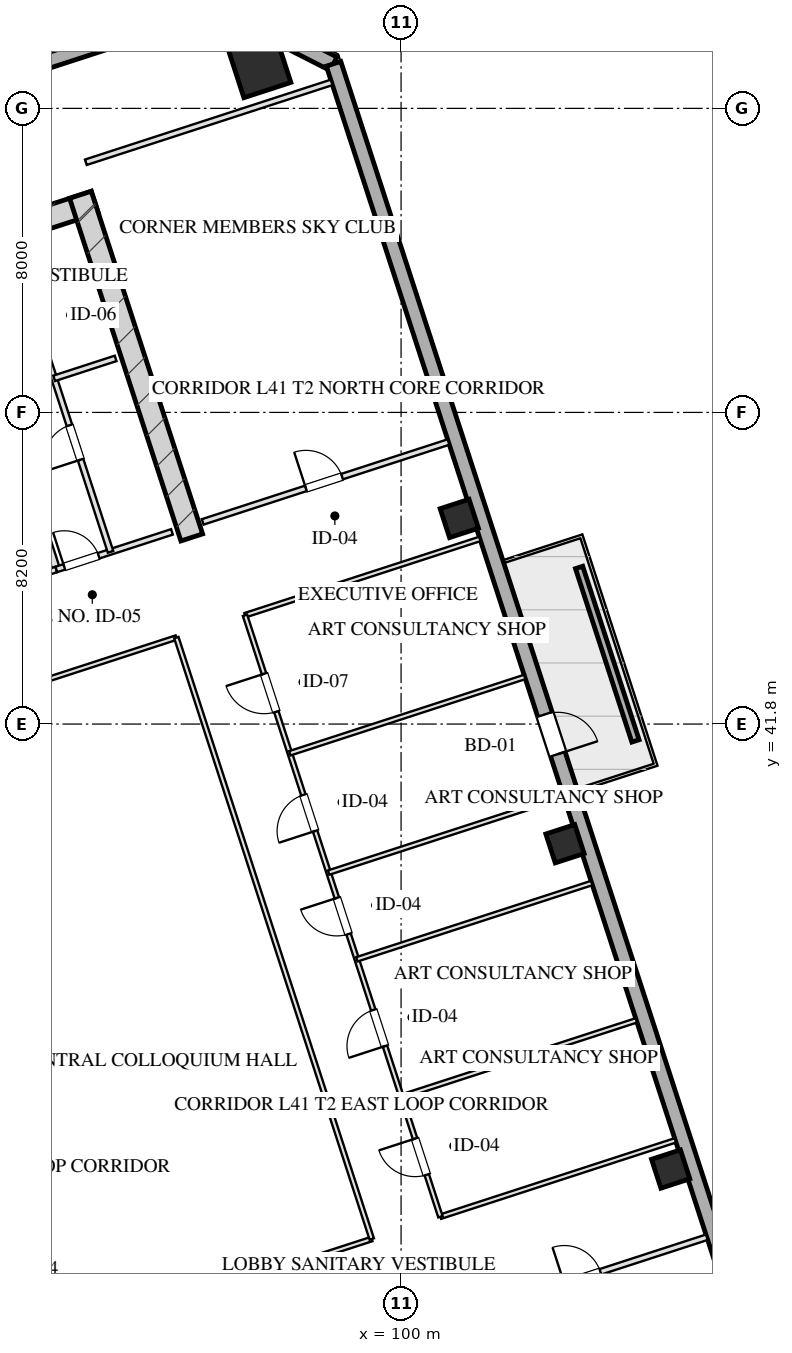
"""IFC4 building model, lengths in metres.
Left out: names, types, materials, properties, quantities, classifications, styles, units other than length and angle.
Written with IfcOpenShell. Run it as: python <this file> out.ifc"""

import sys

from ifc_helpers import new_model, si_unit, direction, frame, frame_2d, origin, origin_2d, place, context, subcontext, project, spatial, rectangle, hollow_rectangle, extrude, element, fill, save


model = new_model("IFC4")
c1 = context("Model", 3, precision=1e-05, world=origin(), true_north=direction((0.0, 1.0)))
c2 = subcontext(c1, "Body", "Model", "MODEL_VIEW")
j1 = project(units=[si_unit("LENGTHUNIT", "METRE"), si_unit("PLANEANGLEUNIT", "RADIAN")], contexts=[c1])
p1 = place(None, origin())
s1 = spatial("IfcSite", under=j1, at=p1, CompositionType="ELEMENT")
p2 = place(p1, origin())
s2 = spatial("IfcBuilding", under=s1, at=p2, CompositionType="ELEMENT")
p3 = place(p2, frame((0.0, 0.0, 156.4)))
s3 = spatial("IfcBuildingStorey", under=s2, at=p3, CompositionType="ELEMENT", Elevation=156.4)
p4 = place(p3, frame((76.344, 50.466, 0.0), z_axis=(0.0, 0.0, 1.0), x_axis=(0.951055727519, 0.309019421968, 0.0)))
e1 = element("IfcWall", 1, at=p4, inside=s3, PredefinedType="SHEAR", context=c2, shape_type="SweptSolid", body=[
    extrude(rectangle(XDim=16.4, YDim=0.6, at=frame_2d((8.2, 0.0))), origin(), (0.0, 0.0, 1.0), 3.45),
])
p5 = place(p3, frame((94.492, 46.71, 0.0), z_axis=(0.0, 0.0, 1.0), x_axis=(-0.309010370028, 0.95105866865, 0.0)))
e2 = element("IfcWall", 2, at=p5, inside=s3, PredefinedType="SHEAR", context=c2, shape_type="SweptSolid", body=[
    extrude(rectangle(XDim=9.48, YDim=0.6, at=frame_2d((4.74, 0.0))), origin(), (0.0, 0.0, 1.0), 3.45),
])
p6 = place(p3, frame((96.281, 59.099, 0.0), z_axis=(0.0, 0.0, 1.0), x_axis=(0.951056516295, 0.309016994375, 0.0)))
e3 = element("IfcColumn", 3, at=p6, inside=s3, PredefinedType="COLUMN", context=c2, shape_type="SweptSolid", body=[
    extrude(hollow_rectangle(XDim=1.3, YDim=1.3, WallThickness=0.045, at=origin_2d()), origin(), (0.0, 0.0, 1.0), 3.451),
])
for number, where, z_axis, x_axis in (
    (4, (107.094, 30.091, 0.0), (0.0, 0.0, 1.0), (0.951, 0.309, 0.0)),
    (5, (104.313, 38.651, 0.0), (0.0, 0.0, 1.0), (0.951, 0.309, 0.0)),
    (6, (101.532, 47.21, 0.0), (0.0, 0.0, 1.0), (0.951, 0.309, 0.0)),
):
    element("IfcColumn", number, at=place(p3, frame(where, z_axis=z_axis, x_axis=x_axis)), inside=s3, PredefinedType="COLUMN", context=c2, shape_type="SweptSolid", body=[
        extrude(hollow_rectangle(XDim=0.8, YDim=0.8, WallThickness=0.028, at=origin_2d()), origin(), (0.0, 0.0, 1.0), 3.451),
    ])
p7 = place(p3, frame((70.092, 52.556, 0.0), z_axis=(0.0, 0.0, 1.0), x_axis=(0.951057580055, 0.30901372044, 0.0)))
e7 = element("IfcWall", 7, at=p7, inside=s3, PredefinedType="SOLIDWALL", context=c2, shape_type="SweptSolid", body=[
    extrude(rectangle(XDim=26.4, YDim=0.4, at=frame_2d((13.2, 0.0))), origin(), (0.0, 0.0, 1.0), 2.61),
])
p8 = place(p3, frame((95.199, 60.714, 0.0), z_axis=(0.0, 0.0, 1.0), x_axis=(0.891020832027, -0.453962417932, 0.0)))
e8 = element("IfcWall", 8, at=p8, inside=s3, PredefinedType="SOLIDWALL", context=c2, shape_type="SweptSolid", body=[
    extrude(rectangle(XDim=3.394, YDim=0.4, at=frame_2d((1.697, 0.0))), origin(), (0.0, 0.0, 1.0), 2.61),
])
p9 = place(p3, frame((98.224, 59.173, 0.0), z_axis=(0.0, 0.0, 1.0), x_axis=(0.309014228706, -0.951057414911, 0.0)))
e9 = element("IfcWall", 9, at=p9, inside=s3, PredefinedType="SOLIDWALL", context=c2, shape_type="SweptSolid", body=[
    extrude(rectangle(XDim=42.8, YDim=0.4, at=frame_2d((21.4, 0.0))), origin(), (0.0, 0.0, 1.0), 2.61),
])
p10 = place(p9, frame((17.999, 0.0, 0.0)))
e10 = element("IfcOpeningElement", 10, at=p10, cuts=e9, PredefinedType="OPENING", context=c2, shape_type="SweptSolid", body=[
    extrude(rectangle(XDim=1.1, YDim=2.15, at=frame_2d((0.55, 1.075))), frame((0.0, 0.21, 0.0), z_axis=(0.0, -1.0, 0.0), x_axis=(1.0, 0.0, 0.0)), (0.0, 0.0, 1.0), 0.42),
])
p11 = place(p3, frame((106.168, 41.356, 0.0), z_axis=(0.0, 0.0, 1.0), x_axis=(-0.309032019345, 0.951051634255, 0.0)))
e11 = element("IfcWall", 11, at=p11, inside=s3, PredefinedType="PARAPET", context=c2, shape_type="SweptSolid", body=[
    extrude(rectangle(XDim=4.8, YDim=0.2, at=frame_2d((2.4, 0.0))), origin(), (0.0, 0.0, 1.0), 0.75),
])
p12 = place(p3, frame((90.928, 45.868, 0.0), z_axis=(0.0, 0.0, 1.0), x_axis=(-0.309042196757, 0.951048327176, 0.0)))
e12 = element("IfcWall", 12, at=p12, inside=s3, PredefinedType="PARTITIONING", context=c2, shape_type="SweptSolid", body=[
    extrude(rectangle(XDim=8.43, YDim=0.2, at=frame_2d((4.215, 0.0))), origin(), (0.0, 0.0, 1.0), 3.175),
])
p13 = place(p3, frame((86.743, 44.508, 0.0), z_axis=(0.0, 0.0, 1.0), x_axis=(0.951063829732, 0.308994485023, 0.0)))
e13 = element("IfcWall", 13, at=p13, inside=s3, PredefinedType="PARTITIONING", context=c2, shape_type="SweptSolid", body=[
    extrude(rectangle(XDim=4.4, YDim=0.15, at=frame_2d((2.2, 0.0))), origin(), (0.0, 0.0, 1.0), 3.175),
])
p14 = place(p13, frame((1.45, 0.0, 0.0)))
e14 = element("IfcOpeningElement", 14, at=p14, cuts=e13, PredefinedType="OPENING", context=c2, shape_type="SweptSolid", body=[
    extrude(rectangle(XDim=1.5, YDim=2.05, at=frame_2d((0.75, 1.025))), frame((0.0, 0.085, 0.0), z_axis=(0.0, -1.0, 0.0), x_axis=(1.0, 0.0, 0.0)), (0.0, 0.0, 1.0), 0.17),
])
p15 = place(p3, frame((90.928, 45.868, 0.0), z_axis=(0.0, 0.0, 1.0), x_axis=(0.951059297078, 0.309008435874, 0.0)))
e15 = element("IfcWall", 15, at=p15, inside=s3, PredefinedType="PARTITIONING", context=c2, shape_type="SweptSolid", body=[
    extrude(rectangle(XDim=3.2, YDim=0.15, at=frame_2d((1.6, 0.0))), origin(), (0.0, 0.0, 1.0), 3.175),
])
p16 = place(p15, frame((0.22, 0.0, 0.0)))
e16 = element("IfcOpeningElement", 16, at=p16, cuts=e15, PredefinedType="OPENING", context=c2, shape_type="SweptSolid", body=[
    extrude(rectangle(XDim=0.95, YDim=2.05, at=frame_2d((0.475, 1.025))), frame((0.0, 0.085, 0.0), z_axis=(0.0, -1.0, 0.0), x_axis=(1.0, 0.0, 0.0)), (0.0, 0.0, 1.0), 0.17),
])
p17 = place(p3, frame((92.355, 46.331, 0.0), z_axis=(0.0, 0.0, 1.0), x_axis=(-0.309007490203, 0.951059604335, 0.0)))
e17 = element("IfcWall", 17, at=p17, inside=s3, PredefinedType="PARTITIONING", context=c2, shape_type="SweptSolid", body=[
    extrude(rectangle(XDim=8.43, YDim=0.15, at=frame_2d((4.215, 0.0))), origin(), (0.0, 0.0, 1.0), 3.175),
])
p18 = place(p17, frame((2.55, 0.0, 0.0)))
e18 = element("IfcOpeningElement", 18, at=p18, cuts=e17, PredefinedType="OPENING", context=c2, shape_type="SweptSolid", body=[
    extrude(rectangle(XDim=0.95, YDim=2.05, at=frame_2d((0.475, 1.025))), frame((0.0, 0.085, 0.0), z_axis=(0.0, -1.0, 0.0), x_axis=(1.0, 0.0, 0.0)), (0.0, 0.0, 1.0), 0.17),
])
p19 = place(p17, frame((5.8, 0.0, 0.0)))
e19 = element("IfcOpeningElement", 19, at=p19, cuts=e17, PredefinedType="OPENING", context=c2, shape_type="SweptSolid", body=[
    extrude(rectangle(XDim=0.9, YDim=2.05, at=frame_2d((0.45, 1.025))), frame((0.0, 0.085, 0.0), z_axis=(0.0, -1.0, 0.0), x_axis=(1.0, 0.0, 0.0)), (0.0, 0.0, 1.0), 0.17),
])
p20 = place(p3, frame((90.871, 50.896, 0.0), z_axis=(0.0, 0.0, 1.0), x_axis=(0.951054116971, 0.309024378638, 0.0)))
e20 = element("IfcWall", 20, at=p20, inside=s3, PredefinedType="PARTITIONING", context=c2, shape_type="SweptSolid", body=[
    extrude(rectangle(XDim=1.7, YDim=0.15, at=frame_2d((0.85, 0.0))), origin(), (0.0, 0.0, 1.0), 3.175),
])
p21 = place(p3, frame((101.578, 26.196, 0.0), z_axis=(0.0, 0.0, 1.0), x_axis=(0.951064934653, 0.308991084134, 0.0)))
e21 = element("IfcWall", 21, at=p21, inside=s3, PredefinedType="PARTITIONING", context=c2, shape_type="SweptSolid", body=[
    extrude(rectangle(XDim=6.8, YDim=0.15, at=frame_2d((3.4, 0.0))), origin(), (0.0, 0.0, 1.0), 3.175),
])
p22 = place(p21, frame((2.856, 0.0, 0.0)))
e22 = element("IfcOpeningElement", 22, at=p22, cuts=e21, PredefinedType="OPENING", context=c2, shape_type="SweptSolid", body=[
    extrude(rectangle(XDim=1.0, YDim=2.05, at=frame_2d((0.5, 1.025))), frame((0.0, 0.085, 0.0), z_axis=(0.0, -1.0, 0.0), x_axis=(1.0, 0.0, 0.0)), (0.0, 0.0, 1.0), 0.17),
])
p23 = place(p3, frame((91.705, 56.582, 0.0), z_axis=(0.0, 0.0, 1.0), x_axis=(0.951057811516, 0.309013008068, 0.0)))
e23 = element("IfcWall", 23, at=p23, inside=s3, PredefinedType="PARTITIONING", context=c2, shape_type="SweptSolid", body=[
    extrude(rectangle(XDim=6.8, YDim=0.15, at=frame_2d((3.4, 0.0))), origin(), (0.0, 0.0, 1.0), 3.175),
])
p24 = place(p3, frame((94.78, 47.119, 0.0), z_axis=(0.0, 0.0, 1.0), x_axis=(0.951057811516, 0.309013008068, 0.0)))
e24 = element("IfcWall", 24, at=p24, inside=s3, PredefinedType="PARTITIONING", context=c2, shape_type="SweptSolid", body=[
    extrude(rectangle(XDim=6.8, YDim=0.15, at=frame_2d((3.4, 0.0))), origin(), (0.0, 0.0, 1.0), 3.175),
])
p25 = place(p24, frame((2.856, 0.0, 0.0)))
e25 = element("IfcOpeningElement", 25, at=p25, cuts=e24, PredefinedType="OPENING", context=c2, shape_type="SweptSolid", body=[
    extrude(rectangle(XDim=1.0, YDim=2.05, at=frame_2d((0.5, 1.025))), frame((0.0, 0.085, 0.0), z_axis=(0.0, -1.0, 0.0), x_axis=(1.0, 0.0, 0.0)), (0.0, 0.0, 1.0), 0.17),
])
p26 = place(p3, frame((91.382, 25.701, 0.0), z_axis=(0.0, 0.0, 1.0), x_axis=(0.951061683147, 0.309001091988, 0.0)))
e26 = element("IfcWall", 26, at=p26, inside=s3, PredefinedType="PARTITIONING", context=c2, shape_type="SweptSolid", body=[
    extrude(rectangle(XDim=8.25, YDim=0.12, at=frame_2d((4.125, 0.0))), origin(), (0.0, 0.0, 1.0), 3.175),
])
p27 = place(p3, frame((101.035, 28.837, 0.0), z_axis=(0.0, 0.0, 1.0), x_axis=(0.95104869662, 0.309041059824, 0.0)))
e27 = element("IfcWall", 27, at=p27, inside=s3, PredefinedType="PARTITIONING", context=c2, shape_type="SweptSolid", body=[
    extrude(rectangle(XDim=6.5, YDim=0.12, at=frame_2d((3.25, 0.0))), origin(), (0.0, 0.0, 1.0), 3.175),
])
p28 = place(p3, frame((86.24, 41.527, 0.0), z_axis=(0.0, 0.0, 1.0), x_axis=(0.951058857521, 0.309009788731, 0.0)))
e28 = element("IfcWall", 28, at=p28, inside=s3, PredefinedType="PARTITIONING", context=c2, shape_type="SweptSolid", body=[
    extrude(rectangle(XDim=8.25, YDim=0.12, at=frame_2d((4.125, 0.0))), origin(), (0.0, 0.0, 1.0), 3.175),
])
p29 = place(p3, frame((95.893, 44.663, 0.0), z_axis=(0.0, 0.0, 1.0), x_axis=(0.951059735424, 0.30900708674, 0.0)))
e29 = element("IfcWall", 29, at=p29, inside=s3, PredefinedType="PARTITIONING", context=c2, shape_type="SweptSolid", body=[
    extrude(rectangle(XDim=6.5, YDim=0.12, at=frame_2d((3.25, 0.0))), origin(), (0.0, 0.0, 1.0), 3.175),
])
p30 = place(p3, frame((91.382, 25.701, 0.0), z_axis=(0.0, 0.0, 1.0), x_axis=(-0.309004459387, 0.951060589068, 0.0)))
e30 = element("IfcWall", 30, at=p30, inside=s3, PredefinedType="PARTITIONING", context=c2, shape_type="SweptSolid", body=[
    extrude(rectangle(XDim=16.64, YDim=0.12, at=frame_2d((8.32, 0.0))), origin(), (0.0, 0.0, 1.0), 3.175),
])
p31 = place(p30, frame((7.987, 0.0, 0.0)))
e31 = element("IfcOpeningElement", 31, at=p31, cuts=e30, PredefinedType="OPENING", context=c2, shape_type="SweptSolid", body=[
    extrude(rectangle(XDim=1.1, YDim=2.05, at=frame_2d((0.55, 1.025))), frame((0.0, 0.07, 0.0), z_axis=(0.0, -1.0, 0.0), x_axis=(1.0, 0.0, 0.0)), (0.0, 0.0, 1.0), 0.14),
])
p32 = place(p3, frame((99.229, 28.25, 0.0), z_axis=(0.0, 0.0, 1.0), x_axis=(-0.30901773025, 0.951056277195, 0.0)))
e32 = element("IfcWall", 32, at=p32, inside=s3, PredefinedType="PARTITIONING", context=c2, shape_type="SweptSolid", body=[
    extrude(rectangle(XDim=16.64, YDim=0.12, at=frame_2d((8.32, 0.0))), origin(), (0.0, 0.0, 1.0), 3.175),
])
p33 = place(p3, frame((101.035, 28.837, 0.0), z_axis=(0.0, 0.0, 1.0), x_axis=(-0.30901773025, 0.951056277195, 0.0)))
e33 = element("IfcWall", 33, at=p33, inside=s3, PredefinedType="PARTITIONING", context=c2, shape_type="SweptSolid", body=[
    extrude(rectangle(XDim=16.64, YDim=0.12, at=frame_2d((8.32, 0.0))), origin(), (0.0, 0.0, 1.0), 3.175),
])
p34 = place(p33, frame((1.16, 0.0, 0.0)))
e34 = element("IfcOpeningElement", 34, at=p34, cuts=e33, PredefinedType="OPENING", context=c2, shape_type="SweptSolid", body=[
    extrude(rectangle(XDim=1.0, YDim=2.05, at=frame_2d((0.5, 1.025))), frame((0.0, 0.07, 0.0), z_axis=(0.0, -1.0, 0.0), x_axis=(1.0, 0.0, 0.0)), (0.0, 0.0, 1.0), 0.14),
])
p35 = place(p33, frame((4.72, 0.0, 0.0)))
e35 = element("IfcOpeningElement", 35, at=p35, cuts=e33, PredefinedType="OPENING", context=c2, shape_type="SweptSolid", body=[
    extrude(rectangle(XDim=1.0, YDim=2.05, at=frame_2d((0.5, 1.025))), frame((0.0, 0.07, 0.0), z_axis=(0.0, -1.0, 0.0), x_axis=(1.0, 0.0, 0.0)), (0.0, 0.0, 1.0), 0.14),
])
p36 = place(p33, frame((7.82, 0.0, 0.0)))
e36 = element("IfcOpeningElement", 36, at=p36, cuts=e33, PredefinedType="OPENING", context=c2, shape_type="SweptSolid", body=[
    extrude(rectangle(XDim=1.0, YDim=2.05, at=frame_2d((0.5, 1.025))), frame((0.0, 0.07, 0.0), z_axis=(0.0, -1.0, 0.0), x_axis=(1.0, 0.0, 0.0)), (0.0, 0.0, 1.0), 0.14),
])
p37 = place(p33, frame((10.671, 0.0, 0.0)))
e37 = element("IfcOpeningElement", 37, at=p37, cuts=e33, PredefinedType="OPENING", context=c2, shape_type="SweptSolid", body=[
    extrude(rectangle(XDim=1.0, YDim=2.05, at=frame_2d((0.5, 1.025))), frame((0.0, 0.07, 0.0), z_axis=(0.0, -1.0, 0.0), x_axis=(1.0, 0.0, 0.0)), (0.0, 0.0, 1.0), 0.14),
])
p38 = place(p33, frame((13.971, 0.0, 0.0)))
e38 = element("IfcOpeningElement", 38, at=p38, cuts=e33, PredefinedType="OPENING", context=c2, shape_type="SweptSolid", body=[
    extrude(rectangle(XDim=1.05, YDim=2.05, at=frame_2d((0.525, 1.025))), frame((0.0, 0.07, 0.0), z_axis=(0.0, -1.0, 0.0), x_axis=(1.0, 0.0, 0.0)), (0.0, 0.0, 1.0), 0.14),
])
for number, where, z_axis, x_axis in (
    (39, (100.01, 31.995, 0.0), (0.0, 0.0, 1.0), (0.951, 0.309, 0.0)),
    (40, (98.835, 35.609, 0.0), (0.0, 0.0, 1.0), (0.951, 0.309, 0.0)),
    (41, (98.094, 37.892, 0.0), (0.0, 0.0, 1.0), (0.951, 0.309, 0.0)),
    (42, (97.073, 41.031, 0.0), (0.0, 0.0, 1.0), (0.951, 0.309, 0.0)),
):
    element("IfcWall", number, at=place(p3, frame(where, z_axis=z_axis, x_axis=x_axis)), inside=s3, PredefinedType="PARTITIONING", context=c2, shape_type="SweptSolid", body=[
        extrude(rectangle(XDim=6.5, YDim=0.12, at=frame_2d((3.25, 0.0))), origin(), (0.0, 0.0, 1.0), 3.175),
    ])
p39 = place(p10, origin())
e43 = element("IfcDoor", 43, at=p39, inside=s3, OperationType="SINGLE_SWING_RIGHT", PredefinedType="DOOR", context=c2, shape_type="SweptSolid", body=[
    extrude(rectangle(XDim=1.1, YDim=2.15, at=frame_2d((0.55, 1.075))), frame((0.0, 0.025, 0.0), z_axis=(0.0, -1.0, 0.0), x_axis=(1.0, 0.0, 0.0)), (0.0, 0.0, 1.0), 0.05),
])
fill(e10, e43)
p40 = place(p16, origin())
e44 = element("IfcDoor", 44, at=p40, inside=s3, OperationType="SINGLE_SWING_LEFT", PredefinedType="DOOR", context=c2, shape_type="SweptSolid", body=[
    extrude(rectangle(XDim=0.95, YDim=2.05, at=frame_2d((0.475, 1.025))), frame((0.0, 0.025, 0.0), z_axis=(0.0, -1.0, 0.0), x_axis=(1.0, 0.0, 0.0)), (0.0, 0.0, 1.0), 0.05),
])
fill(e16, e44)
p41 = place(p18, origin())
e45 = element("IfcDoor", 45, at=p41, inside=s3, OperationType="SINGLE_SWING_LEFT", PredefinedType="DOOR", context=c2, shape_type="SweptSolid", body=[
    extrude(rectangle(XDim=0.95, YDim=2.05, at=frame_2d((0.475, 1.025))), frame((0.0, 0.025, 0.0), z_axis=(0.0, -1.0, 0.0), x_axis=(1.0, 0.0, 0.0)), (0.0, 0.0, 1.0), 0.05),
])
fill(e18, e45)
p42 = place(p22, origin())
e46 = element("IfcDoor", 46, at=p42, inside=s3, OperationType="SINGLE_SWING_LEFT", PredefinedType="DOOR", context=c2, shape_type="SweptSolid", body=[
    extrude(rectangle(XDim=1.0, YDim=2.05, at=frame_2d((0.5, 1.025))), frame((0.0, 0.025, 0.0), z_axis=(0.0, -1.0, 0.0), x_axis=(1.0, 0.0, 0.0)), (0.0, 0.0, 1.0), 0.05),
])
fill(e22, e46)
p43 = place(p25, origin())
e47 = element("IfcDoor", 47, at=p43, inside=s3, OperationType="SINGLE_SWING_LEFT", PredefinedType="DOOR", context=c2, shape_type="SweptSolid", body=[
    extrude(rectangle(XDim=1.0, YDim=2.05, at=frame_2d((0.5, 1.025))), frame((0.0, 0.025, 0.0), z_axis=(0.0, -1.0, 0.0), x_axis=(1.0, 0.0, 0.0)), (0.0, 0.0, 1.0), 0.05),
])
fill(e25, e47)
p44 = place(p34, origin())
e48 = element("IfcDoor", 48, at=p44, inside=s3, OperationType="SINGLE_SWING_RIGHT", PredefinedType="DOOR", context=c2, shape_type="SweptSolid", body=[
    extrude(rectangle(XDim=1.0, YDim=2.05, at=frame_2d((0.5, 1.025))), frame((0.0, 0.025, 0.0), z_axis=(0.0, -1.0, 0.0), x_axis=(1.0, 0.0, 0.0)), (0.0, 0.0, 1.0), 0.05),
])
fill(e34, e48)
p45 = place(p35, origin())
e49 = element("IfcDoor", 49, at=p45, inside=s3, OperationType="SINGLE_SWING_LEFT", PredefinedType="DOOR", context=c2, shape_type="SweptSolid", body=[
    extrude(rectangle(XDim=1.0, YDim=2.05, at=frame_2d((0.5, 1.025))), frame((0.0, 0.025, 0.0), z_axis=(0.0, -1.0, 0.0), x_axis=(1.0, 0.0, 0.0)), (0.0, 0.0, 1.0), 0.05),
])
fill(e35, e49)
p46 = place(p36, origin())
e50 = element("IfcDoor", 50, at=p46, inside=s3, OperationType="SINGLE_SWING_RIGHT", PredefinedType="DOOR", context=c2, shape_type="SweptSolid", body=[
    extrude(rectangle(XDim=1.0, YDim=2.05, at=frame_2d((0.5, 1.025))), frame((0.0, 0.025, 0.0), z_axis=(0.0, -1.0, 0.0), x_axis=(1.0, 0.0, 0.0)), (0.0, 0.0, 1.0), 0.05),
])
fill(e36, e50)
p47 = place(p37, origin())
e51 = element("IfcDoor", 51, at=p47, inside=s3, OperationType="SINGLE_SWING_LEFT", PredefinedType="DOOR", context=c2, shape_type="SweptSolid", body=[
    extrude(rectangle(XDim=1.0, YDim=2.05, at=frame_2d((0.5, 1.025))), frame((0.0, 0.025, 0.0), z_axis=(0.0, -1.0, 0.0), x_axis=(1.0, 0.0, 0.0)), (0.0, 0.0, 1.0), 0.05),
])
fill(e37, e51)
p48 = place(p38, origin())
e52 = element("IfcDoor", 52, at=p48, inside=s3, OperationType="SINGLE_SWING_RIGHT", PredefinedType="DOOR", context=c2, shape_type="SweptSolid", body=[
    extrude(rectangle(XDim=1.05, YDim=2.05, at=frame_2d((0.525, 1.025))), frame((0.0, 0.025, 0.0), z_axis=(0.0, -1.0, 0.0), x_axis=(1.0, 0.0, 0.0)), (0.0, 0.0, 1.0), 0.05),
])
fill(e38, e52)
save(model, sys.argv[1])
